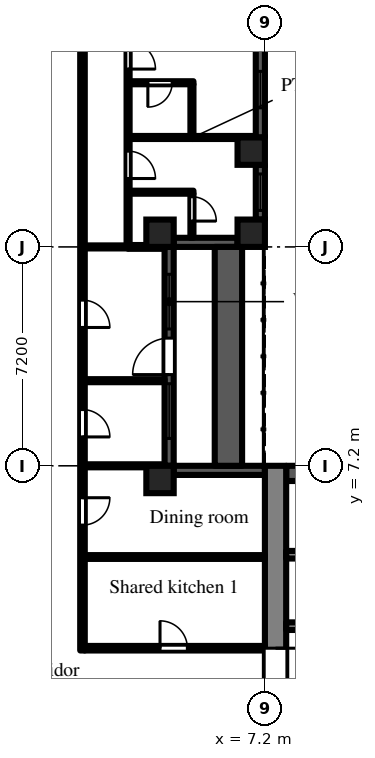
"""IFC4 building model, lengths in metres.
Left out: names, types, materials, properties, quantities, classifications, styles, units other than length and angle.
Written with IfcOpenShell. Run it as: python <this file> out.ifc"""

import sys

from ifc_helpers import new_model, si_unit, direction, frame, frame_2d, origin, origin_2d, place, context, subcontext, project, spatial, rectangle, extrude, element, fill, save


model = new_model("IFC4")
c1 = context("Model", 3, precision=1e-05, world=origin(), true_north=direction((0.0, 1.0)))
c2 = subcontext(c1, "Body", "Model", "MODEL_VIEW")
j1 = project(units=[si_unit("LENGTHUNIT", "METRE"), si_unit("PLANEANGLEUNIT", "RADIAN")], contexts=[c1])
p1 = place(None, origin())
s1 = spatial("IfcSite", under=j1, at=p1, CompositionType="ELEMENT")
p2 = place(p1, origin())
s2 = spatial("IfcBuilding", under=s1, at=p2, CompositionType="ELEMENT")
p3 = place(p2, frame((0.0, 0.0, 35.7)))
s3 = spatial("IfcBuildingStorey", under=s2, at=p3, CompositionType="ELEMENT", Elevation=35.7)
for number, where, z_axis, x_axis in (
    (1, (3.75, 6.75, 0.0), (0.0, 0.0, 1.0), (1.0, 0.0, 0.0)),
    (2, (3.75, 14.85, 0.0), (0.0, 0.0, 1.0), (1.0, 0.0, 0.0)),
    (3, (6.75, 14.85, 0.0), (0.0, 0.0, 1.0), (1.0, 0.0, 0.0)),
    (4, (6.75, 17.55, 0.0), (0.0, 0.0, 1.0), (1.0, 0.0, 0.0)),
):
    element("IfcColumn", number, at=place(p3, frame(where, z_axis=z_axis, x_axis=x_axis)), inside=s3, PredefinedType="COLUMN", context=c2, shape_type="SweptSolid", body=[
        extrude(rectangle(XDim=0.9, YDim=0.9, at=origin_2d()), origin(), (0.0, 0.0, 1.0), 3.0),
    ])
p4 = place(p3, frame((7.2, 7.05, 0.0), z_axis=(0.0, 0.0, 1.0), x_axis=(-1.0, 0.0, 0.0)))
e5 = element("IfcWall", 5, at=p4, inside=s3, PredefinedType="SOLIDWALL", context=c2, shape_type="SweptSolid", body=[
    extrude(rectangle(XDim=3.0, YDim=0.3, at=frame_2d((1.5, 0.0))), origin(), (0.0, 0.0, 1.0), 2.1),
])
p5 = place(p3, frame((4.05, 7.2, 0.0), z_axis=(0.0, 0.0, 1.0), x_axis=(0.0, 1.0, 0.0)))
e6 = element("IfcWall", 6, at=p5, inside=s3, PredefinedType="SOLIDWALL", context=c2, shape_type="SweptSolid", body=[
    extrude(rectangle(XDim=7.2, YDim=0.3, at=frame_2d((3.6, 0.0))), origin(), (0.0, 0.0, 1.0), 2.1),
])
p6 = place(p5, frame((3.0, 0.0, 0.0)))
e7 = element("IfcOpeningElement", 7, at=p6, cuts=e6, PredefinedType="OPENING", context=c2, shape_type="SweptSolid", body=[
    extrude(rectangle(XDim=1.2, YDim=2.05, at=frame_2d((0.6, 1.025))), frame((0.0, 0.16, 0.0), z_axis=(0.0, -1.0, 0.0), x_axis=(1.0, 0.0, 0.0)), (0.0, 0.0, 1.0), 0.32),
])
p7 = place(p5, frame((0.9, 0.0, 0.2)))
e8 = element("IfcOpeningElement", 8, at=p7, cuts=e6, PredefinedType="OPENING", context=c2, shape_type="SweptSolid", body=[
    extrude(rectangle(XDim=1.8, YDim=1.85, at=frame_2d((0.9, 0.925))), frame((0.0, 0.16, 0.0), z_axis=(0.0, -1.0, 0.0), x_axis=(1.0, 0.0, 0.0)), (0.0, 0.0, 1.0), 0.32),
])
p8 = place(p5, frame((4.5, 0.0, 0.2)))
e9 = element("IfcOpeningElement", 9, at=p8, cuts=e6, PredefinedType="OPENING", context=c2, shape_type="SweptSolid", body=[
    extrude(rectangle(XDim=1.8, YDim=1.85, at=frame_2d((0.9, 0.925))), frame((0.0, 0.16, 0.0), z_axis=(0.0, -1.0, 0.0), x_axis=(1.0, 0.0, 0.0)), (0.0, 0.0, 1.0), 0.32),
])
p9 = place(p3, frame((4.2, 14.55, 0.0), z_axis=(0.0, 0.0, 1.0), x_axis=(1.0, 0.0, 0.0)))
e10 = element("IfcWall", 10, at=p9, inside=s3, PredefinedType="SOLIDWALL", context=c2, shape_type="SweptSolid", body=[
    extrude(rectangle(XDim=2.1, YDim=0.3, at=frame_2d((1.05, 0.0))), origin(), (0.0, 0.0, 1.0), 2.1),
])
p10 = place(p3, frame((7.05, 15.3, 0.0), z_axis=(0.0, 0.0, 1.0), x_axis=(0.0, 1.0, 0.0)))
e11 = element("IfcWall", 11, at=p10, inside=s3, PredefinedType="SOLIDWALL", context=c2, shape_type="SweptSolid", body=[
    extrude(rectangle(XDim=1.8, YDim=0.3, at=frame_2d((0.9, 0.0))), origin(), (0.0, 0.0, 1.0), 2.1),
])
p11 = place(p10, frame((0.3, 0.0, 0.2)))
e12 = element("IfcOpeningElement", 12, at=p11, cuts=e11, PredefinedType="OPENING", context=c2, shape_type="SweptSolid", body=[
    extrude(rectangle(XDim=1.2, YDim=1.85, at=frame_2d((0.6, 0.925))), frame((0.0, 0.16, 0.0), z_axis=(0.0, -1.0, 0.0), x_axis=(1.0, 0.0, 0.0)), (0.0, 0.0, 1.0), 0.32),
])
p12 = place(p3, frame((7.05, 18.0, 0.0), z_axis=(0.0, 0.0, 1.0), x_axis=(0.0, 1.0, 0.0)))
e13 = element("IfcWall", 13, at=p12, inside=s3, PredefinedType="SOLIDWALL", context=c2, shape_type="SweptSolid", body=[
    extrude(rectangle(XDim=3.15, YDim=0.3, at=frame_2d((1.575, 0.0))), origin(), (0.0, 0.0, 1.0), 2.1),
])
p13 = place(p12, frame((0.975, 0.0, 0.2)))
e14 = element("IfcOpeningElement", 14, at=p13, cuts=e13, PredefinedType="OPENING", context=c2, shape_type="SweptSolid", body=[
    extrude(rectangle(XDim=1.2, YDim=1.85, at=frame_2d((0.6, 0.925))), frame((0.0, 0.16, 0.0), z_axis=(0.0, -1.0, 0.0), x_axis=(1.0, 0.0, 0.0)), (0.0, 0.0, 1.0), 0.32),
])
p14 = place(p3, frame((6.0, 7.2, 0.0), z_axis=(0.0, 0.0, 1.0), x_axis=(0.0, 1.0, 0.0)))
e15 = element("IfcWall", 15, at=p14, inside=s3, PredefinedType="PARAPET", context=c2, shape_type="SweptSolid", body=[
    extrude(rectangle(XDim=7.2, YDim=0.9, at=frame_2d((3.6, 0.0))), origin(), (0.0, 0.0, 1.0), 0.8),
])
p15 = place(p3, frame((7.55, -7.2, 0.0), z_axis=(0.0, 0.0, 1.0), x_axis=(0.0, 1.0, 0.0)))
e16 = element("IfcWall", 16, at=p15, inside=s3, PredefinedType="SHEAR", context=c2, shape_type="SweptSolid", body=[
    extrude(rectangle(XDim=14.4, YDim=0.7, at=frame_2d((7.2, 0.0))), origin(), (0.0, 0.0, 1.0), 2.575),
])
p16 = place(p15, frame((6.0, 0.0, 0.0)))
e17 = element("IfcOpeningElement", 17, at=p16, cuts=e16, PredefinedType="OPENING", context=c2, shape_type="SweptSolid", body=[
    extrude(rectangle(XDim=2.4, YDim=2.2, at=frame_2d((1.2, 1.1))), frame((0.0, 0.36, 0.0), z_axis=(0.0, -1.0, 0.0), x_axis=(1.0, 0.0, 0.0)), (0.0, 0.0, 1.0), 0.72),
])
p17 = place(p3, frame((7.9, 6.95, 0.0), z_axis=(0.0, 0.0, 1.0), x_axis=(1.0, 0.0, 0.0)))
e18 = element("IfcWall", 18, at=p17, inside=s3, PredefinedType="SHEAR", context=c2, shape_type="SweptSolid", body=[
    extrude(rectangle(XDim=12.95, YDim=0.5, at=frame_2d((6.475, 0.0))), origin(), (0.0, 0.0, 1.0), 2.575),
])
p18 = place(p3, frame((7.9, 1.925, 0.0), z_axis=(0.0, 0.0, 1.0), x_axis=(1.0, 0.0, 0.0)))
e19 = element("IfcWall", 19, at=p18, inside=s3, PredefinedType="SHEAR", context=c2, shape_type="SweptSolid", body=[
    extrude(rectangle(XDim=12.95, YDim=0.25, at=frame_2d((6.475, 0.0))), origin(), (0.0, 0.0, 1.0), 2.575),
])
p19 = place(p18, frame((0.525, 0.0, 0.0)))
e20 = element("IfcOpeningElement", 20, at=p19, cuts=e19, PredefinedType="OPENING", context=c2, shape_type="SweptSolid", body=[
    extrude(rectangle(XDim=0.9, YDim=2.1, at=frame_2d((0.45, 1.05))), frame((0.0, 0.135, 0.0), z_axis=(0.0, -1.0, 0.0), x_axis=(1.0, 0.0, 0.0)), (0.0, 0.0, 1.0), 0.27),
])
p20 = place(p18, frame((2.625, 0.0, 0.0)))
e21 = element("IfcOpeningElement", 21, at=p20, cuts=e19, PredefinedType="OPENING", context=c2, shape_type="SweptSolid", body=[
    extrude(rectangle(XDim=1.1, YDim=2.1, at=frame_2d((0.55, 1.05))), frame((0.0, 0.135, 0.0), z_axis=(0.0, -1.0, 0.0), x_axis=(1.0, 0.0, 0.0)), (0.0, 0.0, 1.0), 0.27),
])
p21 = place(p18, frame((7.125, 0.0, 0.0)))
e22 = element("IfcOpeningElement", 22, at=p21, cuts=e19, PredefinedType="OPENING", context=c2, shape_type="SweptSolid", body=[
    extrude(rectangle(XDim=0.9, YDim=2.1, at=frame_2d((0.45, 1.05))), frame((0.0, 0.135, 0.0), z_axis=(0.0, -1.0, 0.0), x_axis=(1.0, 0.0, 0.0)), (0.0, 0.0, 1.0), 0.27),
])
p22 = place(p3, frame((7.9, 4.275, 0.0), z_axis=(0.0, 0.0, 1.0), x_axis=(1.0, 0.0, 0.0)))
e23 = element("IfcWall", 23, at=p22, inside=s3, PredefinedType="SHEAR", context=c2, shape_type="SweptSolid", body=[
    extrude(rectangle(XDim=1.95, YDim=0.25, at=frame_2d((0.975, 0.0))), origin(), (0.0, 0.0, 1.0), 2.575),
])
p23 = place(p3, frame((1.2, 1.125, 0.0), z_axis=(0.0, 0.0, 1.0), x_axis=(0.0, 1.0, 0.0)))
e24 = element("IfcWall", 24, at=p23, inside=s3, PredefinedType="PARTITIONING", context=c2, shape_type="SweptSolid", body=[
    extrude(rectangle(XDim=35.375, YDim=0.15, at=frame_2d((17.688, 0.0))), origin(), (0.0, 0.0, 1.0), 2.575),
])
p24 = place(p23, frame((4.125, 0.0, 0.0)))
e25 = element("IfcOpeningElement", 25, at=p24, cuts=e24, PredefinedType="OPENING", context=c2, shape_type="SweptSolid", body=[
    extrude(rectangle(XDim=0.9, YDim=2.1, at=frame_2d((0.45, 1.05))), frame((0.0, 0.085, 0.0), z_axis=(0.0, -1.0, 0.0), x_axis=(1.0, 0.0, 0.0)), (0.0, 0.0, 1.0), 0.17),
])
p25 = place(p23, frame((7.025, 0.0, 0.0)))
e26 = element("IfcOpeningElement", 26, at=p25, cuts=e24, PredefinedType="OPENING", context=c2, shape_type="SweptSolid", body=[
    extrude(rectangle(XDim=0.9, YDim=2.1, at=frame_2d((0.45, 1.05))), frame((0.0, 0.085, 0.0), z_axis=(0.0, -1.0, 0.0), x_axis=(1.0, 0.0, 0.0)), (0.0, 0.0, 1.0), 0.17),
])
p26 = place(p23, frame((10.625, 0.0, 0.0)))
e27 = element("IfcOpeningElement", 27, at=p26, cuts=e24, PredefinedType="OPENING", context=c2, shape_type="SweptSolid", body=[
    extrude(rectangle(XDim=0.9, YDim=2.1, at=frame_2d((0.45, 1.05))), frame((0.0, 0.085, 0.0), z_axis=(0.0, -1.0, 0.0), x_axis=(1.0, 0.0, 0.0)), (0.0, 0.0, 1.0), 0.17),
])
p27 = place(p23, frame((32.825, 0.0, 0.0)))
e28 = element("IfcOpeningElement", 28, at=p27, cuts=e24, PredefinedType="OPENING", context=c2, shape_type="SweptSolid", body=[
    extrude(rectangle(XDim=1.0, YDim=2.1, at=frame_2d((0.5, 1.05))), frame((0.0, 0.085, 0.0), z_axis=(0.0, -1.0, 0.0), x_axis=(1.0, 0.0, 0.0)), (0.0, 0.0, 1.0), 0.17),
])
p28 = place(p3, frame((1.275, 1.2, 0.0), z_axis=(0.0, 0.0, 1.0), x_axis=(1.0, 0.0, 0.0)))
e29 = element("IfcWall", 29, at=p28, inside=s3, PredefinedType="PARTITIONING", context=c2, shape_type="SweptSolid", body=[
    extrude(rectangle(XDim=5.925, YDim=0.15, at=frame_2d((2.962, 0.0))), origin(), (0.0, 0.0, 1.0), 2.575),
])
p29 = place(p28, frame((2.475, 0.0, 0.0)))
e30 = element("IfcOpeningElement", 30, at=p29, cuts=e29, PredefinedType="OPENING", context=c2, shape_type="SweptSolid", body=[
    extrude(rectangle(XDim=0.9, YDim=2.1, at=frame_2d((0.45, 1.05))), frame((0.0, 0.085, 0.0), z_axis=(0.0, -1.0, 0.0), x_axis=(1.0, 0.0, 0.0)), (0.0, 0.0, 1.0), 0.17),
])
p30 = place(p3, frame((1.275, 4.2, 0.0), z_axis=(0.0, 0.0, 1.0), x_axis=(1.0, 0.0, 0.0)))
e31 = element("IfcWall", 31, at=p30, inside=s3, PredefinedType="PARTITIONING", context=c2, shape_type="SweptSolid", body=[
    extrude(rectangle(XDim=5.925, YDim=0.125, at=frame_2d((2.962, 0.0))), origin(), (0.0, 0.0, 1.0), 2.575),
])
for number, where, z_axis, x_axis in (
    (32, (1.275, 7.2, 0.0), (0.0, 0.0, 1.0), (1.0, 0.0, 0.0)),
    (33, (1.275, 10.0, 0.0), (0.0, 0.0, 1.0), (1.0, 0.0, 0.0)),
):
    element("IfcWall", number, at=place(p3, frame(where, z_axis=z_axis, x_axis=x_axis)), inside=s3, PredefinedType="PARTITIONING", context=c2, shape_type="SweptSolid", body=[
        extrude(rectangle(XDim=2.625, YDim=0.1, at=frame_2d((1.312, 0.0))), origin(), (0.0, 0.0, 1.0), 2.575),
    ])
p31 = place(p3, frame((1.275, 14.4, 0.0), z_axis=(0.0, 0.0, 1.0), x_axis=(1.0, 0.0, 0.0)))
e34 = element("IfcWall", 34, at=p31, inside=s3, PredefinedType="PARTITIONING", context=c2, shape_type="SweptSolid", body=[
    extrude(rectangle(XDim=1.425, YDim=0.1, at=frame_2d((0.712, 0.0))), origin(), (0.0, 0.0, 1.0), 2.575),
])
p32 = place(p3, frame((2.7, 14.462, 0.0), z_axis=(0.0, 0.0, 1.0), x_axis=(0.0, 1.0, 0.0)))
e35 = element("IfcWall", 35, at=p32, inside=s3, PredefinedType="PARTITIONING", context=c2, shape_type="SweptSolid", body=[
    extrude(rectangle(XDim=17.888, YDim=0.1, at=frame_2d((8.944, 0.0))), origin(), (0.0, 0.0, 1.0), 2.575),
])
p33 = place(p32, frame((2.188, 0.0, 0.0)))
e36 = element("IfcOpeningElement", 36, at=p33, cuts=e35, PredefinedType="OPENING", context=c2, shape_type="SweptSolid", body=[
    extrude(rectangle(XDim=0.9, YDim=2.1, at=frame_2d((0.45, 1.05))), frame((0.0, 0.06, 0.0), z_axis=(0.0, -1.0, 0.0), x_axis=(1.0, 0.0, 0.0)), (0.0, 0.0, 1.0), 0.12),
])
p34 = place(p32, frame((5.788, 0.0, 0.0)))
e37 = element("IfcOpeningElement", 37, at=p34, cuts=e35, PredefinedType="OPENING", context=c2, shape_type="SweptSolid", body=[
    extrude(rectangle(XDim=0.9, YDim=2.1, at=frame_2d((0.45, 1.05))), frame((0.0, 0.06, 0.0), z_axis=(0.0, -1.0, 0.0), x_axis=(1.0, 0.0, 0.0)), (0.0, 0.0, 1.0), 0.12),
])
p35 = place(p32, frame((7.587, 0.0, 0.0)))
e38 = element("IfcOpeningElement", 38, at=p35, cuts=e35, PredefinedType="OPENING", context=c2, shape_type="SweptSolid", body=[
    extrude(rectangle(XDim=0.9, YDim=2.1, at=frame_2d((0.45, 1.05))), frame((0.0, 0.06, 0.0), z_axis=(0.0, -1.0, 0.0), x_axis=(1.0, 0.0, 0.0)), (0.0, 0.0, 1.0), 0.12),
])
p36 = place(p32, frame((12.988, 0.0, 0.0)))
e39 = element("IfcOpeningElement", 39, at=p36, cuts=e35, PredefinedType="OPENING", context=c2, shape_type="SweptSolid", body=[
    extrude(rectangle(XDim=0.9, YDim=2.1, at=frame_2d((0.45, 1.05))), frame((0.0, 0.06, 0.0), z_axis=(0.0, -1.0, 0.0), x_axis=(1.0, 0.0, 0.0)), (0.0, 0.0, 1.0), 0.12),
])
p37 = place(p32, frame((14.788, 0.0, 0.0)))
e40 = element("IfcOpeningElement", 40, at=p37, cuts=e35, PredefinedType="OPENING", context=c2, shape_type="SweptSolid", body=[
    extrude(rectangle(XDim=0.9, YDim=2.1, at=frame_2d((0.45, 1.05))), frame((0.0, 0.06, 0.0), z_axis=(0.0, -1.0, 0.0), x_axis=(1.0, 0.0, 0.0)), (0.0, 0.0, 1.0), 0.12),
])
p38 = place(p3, frame((2.7, 14.4, 0.0), z_axis=(0.0, 0.0, 1.0), x_axis=(1.0, 0.0, 0.0)))
e41 = element("IfcWall", 41, at=p38, inside=s3, PredefinedType="PARTITIONING", context=c2, shape_type="SweptSolid", body=[
    extrude(rectangle(XDim=1.2, YDim=0.125, at=frame_2d((0.6, 0.0))), origin(), (0.0, 0.0, 1.0), 2.575),
])
p39 = place(p3, frame((2.75, 16.2, 0.0), z_axis=(0.0, 0.0, 1.0), x_axis=(1.0, 0.0, 0.0)))
e42 = element("IfcWall", 42, at=p39, inside=s3, PredefinedType="PARTITIONING", context=c2, shape_type="SweptSolid", body=[
    extrude(rectangle(XDim=2.1, YDim=0.1, at=frame_2d((1.05, 0.0))), origin(), (0.0, 0.0, 1.0), 2.575),
])
p40 = place(p3, frame((2.75, 18.0, 0.0), z_axis=(0.0, 0.0, 1.0), x_axis=(1.0, 0.0, 0.0)))
e43 = element("IfcWall", 43, at=p40, inside=s3, PredefinedType="PARTITIONING", context=c2, shape_type="SweptSolid", body=[
    extrude(rectangle(XDim=4.15, YDim=0.1, at=frame_2d((2.075, 0.0))), origin(), (0.0, 0.0, 1.0), 2.575),
])
p41 = place(p3, frame((2.75, 19.8, 0.0), z_axis=(0.0, 0.0, 1.0), x_axis=(1.0, 0.0, 0.0)))
e44 = element("IfcWall", 44, at=p41, inside=s3, PredefinedType="PARTITIONING", context=c2, shape_type="SweptSolid", body=[
    extrude(rectangle(XDim=2.1, YDim=0.1, at=frame_2d((1.05, 0.0))), origin(), (0.0, 0.0, 1.0), 2.575),
])
p42 = place(p41, frame((0.6, 0.0, 0.0)))
e45 = element("IfcOpeningElement", 45, at=p42, cuts=e44, PredefinedType="OPENING", context=c2, shape_type="SweptSolid", body=[
    extrude(rectangle(XDim=0.8, YDim=2.1, at=frame_2d((0.4, 1.05))), frame((0.0, 0.06, 0.0), z_axis=(0.0, -1.0, 0.0), x_axis=(1.0, 0.0, 0.0)), (0.0, 0.0, 1.0), 0.12),
])
p43 = place(p3, frame((4.8, 14.7, 0.0), z_axis=(0.0, 0.0, 1.0), x_axis=(0.0, 1.0, 0.0)))
e46 = element("IfcWall", 46, at=p43, inside=s3, PredefinedType="PARTITIONING", context=c2, shape_type="SweptSolid", body=[
    extrude(rectangle(XDim=1.45, YDim=0.1, at=frame_2d((0.725, 0.0))), origin(), (0.0, 0.0, 1.0), 2.575),
])
p44 = place(p43, frame((0.55, 0.0, 0.0)))
e47 = element("IfcOpeningElement", 47, at=p44, cuts=e46, PredefinedType="OPENING", context=c2, shape_type="SweptSolid", body=[
    extrude(rectangle(XDim=0.8, YDim=2.1, at=frame_2d((0.4, 1.05))), frame((0.0, 0.06, 0.0), z_axis=(0.0, -1.0, 0.0), x_axis=(1.0, 0.0, 0.0)), (0.0, 0.0, 1.0), 0.12),
])
p45 = place(p3, frame((4.8, 18.05, 0.0), z_axis=(0.0, 0.0, 1.0), x_axis=(0.0, 1.0, 0.0)))
e48 = element("IfcWall", 48, at=p45, inside=s3, PredefinedType="PARTITIONING", context=c2, shape_type="SweptSolid", body=[
    extrude(rectangle(XDim=1.7, YDim=0.1, at=frame_2d((0.85, 0.0))), origin(), (0.0, 0.0, 1.0), 2.575),
])
p46 = place(p6, origin())
e49 = element("IfcDoor", 49, at=p46, inside=s3, OperationType="SINGLE_SWING_LEFT", PredefinedType="DOOR", context=c2, shape_type="SweptSolid", body=[
    extrude(rectangle(XDim=1.2, YDim=2.05, at=frame_2d((0.6, 1.025))), frame((0.0, 0.025, 0.0), z_axis=(0.0, -1.0, 0.0), x_axis=(1.0, 0.0, 0.0)), (0.0, 0.0, 1.0), 0.05),
])
fill(e7, e49)
p47 = place(p7, origin())
e50 = element("IfcWindow", 50, at=p47, inside=s3, PartitioningType="SINGLE_PANEL", PredefinedType="WINDOW", context=c2, shape_type="SweptSolid", body=[
    extrude(rectangle(XDim=1.8, YDim=1.85, at=frame_2d((0.9, 0.925))), frame((0.0, 0.03, 0.0), z_axis=(0.0, -1.0, 0.0), x_axis=(1.0, 0.0, 0.0)), (0.0, 0.0, 1.0), 0.06),
])
fill(e8, e50)
p48 = place(p8, origin())
e51 = element("IfcWindow", 51, at=p48, inside=s3, PartitioningType="SINGLE_PANEL", PredefinedType="WINDOW", context=c2, shape_type="SweptSolid", body=[
    extrude(rectangle(XDim=1.8, YDim=1.85, at=frame_2d((0.9, 0.925))), frame((0.0, 0.03, 0.0), z_axis=(0.0, -1.0, 0.0), x_axis=(1.0, 0.0, 0.0)), (0.0, 0.0, 1.0), 0.06),
])
fill(e9, e51)
p49 = place(p11, origin())
e52 = element("IfcWindow", 52, at=p49, inside=s3, PartitioningType="SINGLE_PANEL", PredefinedType="WINDOW", context=c2, shape_type="SweptSolid", body=[
    extrude(rectangle(XDim=1.2, YDim=1.85, at=frame_2d((0.6, 0.925))), frame((0.0, 0.03, 0.0), z_axis=(0.0, -1.0, 0.0), x_axis=(1.0, 0.0, 0.0)), (0.0, 0.0, 1.0), 0.06),
])
fill(e12, e52)
p50 = place(p13, origin())
e53 = element("IfcWindow", 53, at=p50, inside=s3, PartitioningType="SINGLE_PANEL", PredefinedType="WINDOW", context=c2, shape_type="SweptSolid", body=[
    extrude(rectangle(XDim=1.2, YDim=1.85, at=frame_2d((0.6, 0.925))), frame((0.0, 0.03, 0.0), z_axis=(0.0, -1.0, 0.0), x_axis=(1.0, 0.0, 0.0)), (0.0, 0.0, 1.0), 0.06),
])
fill(e14, e53)
p51 = place(p16, frame((2.4, 0.0, 0.0), z_axis=(0.0, 0.0, 1.0), x_axis=(-1.0, 0.0, 0.0)))
e54 = element("IfcDoor", 54, at=p51, inside=s3, OperationType="DOUBLE_DOOR_DOUBLE_SWING", PredefinedType="DOOR", context=c2, shape_type="SweptSolid", body=[
    extrude(rectangle(XDim=2.4, YDim=2.2, at=frame_2d((1.2, 1.1))), frame((0.0, 0.025, 0.0), z_axis=(0.0, -1.0, 0.0), x_axis=(1.0, 0.0, 0.0)), (0.0, 0.0, 1.0), 0.05),
])
fill(e17, e54)
p52 = place(p29, origin())
e55 = element("IfcDoor", 55, at=p52, inside=s3, OperationType="SINGLE_SWING_LEFT", PredefinedType="DOOR", context=c2, shape_type="SweptSolid", body=[
    extrude(rectangle(XDim=0.9, YDim=2.1, at=frame_2d((0.45, 1.05))), frame((0.0, 0.025, 0.0), z_axis=(0.0, -1.0, 0.0), x_axis=(1.0, 0.0, 0.0)), (0.0, 0.0, 1.0), 0.05),
])
fill(e30, e55)
p53 = place(p24, frame((0.9, 0.0, 0.0), z_axis=(0.0, 0.0, 1.0), x_axis=(-1.0, 0.0, 0.0)))
e56 = element("IfcDoor", 56, at=p53, inside=s3, OperationType="SINGLE_SWING_LEFT", PredefinedType="DOOR", context=c2, shape_type="SweptSolid", body=[
    extrude(rectangle(XDim=0.9, YDim=2.1, at=frame_2d((0.45, 1.05))), frame((0.0, 0.025, 0.0), z_axis=(0.0, -1.0, 0.0), x_axis=(1.0, 0.0, 0.0)), (0.0, 0.0, 1.0), 0.05),
])
fill(e25, e56)
p54 = place(p25, frame((0.9, 0.0, 0.0), z_axis=(0.0, 0.0, 1.0), x_axis=(-1.0, 0.0, 0.0)))
e57 = element("IfcDoor", 57, at=p54, inside=s3, OperationType="SINGLE_SWING_RIGHT", PredefinedType="DOOR", context=c2, shape_type="SweptSolid", body=[
    extrude(rectangle(XDim=0.9, YDim=2.1, at=frame_2d((0.45, 1.05))), frame((0.0, 0.025, 0.0), z_axis=(0.0, -1.0, 0.0), x_axis=(1.0, 0.0, 0.0)), (0.0, 0.0, 1.0), 0.05),
])
fill(e26, e57)
p55 = place(p26, frame((0.9, 0.0, 0.0), z_axis=(0.0, 0.0, 1.0), x_axis=(-1.0, 0.0, 0.0)))
e58 = element("IfcDoor", 58, at=p55, inside=s3, OperationType="SINGLE_SWING_RIGHT", PredefinedType="DOOR", context=c2, shape_type="SweptSolid", body=[
    extrude(rectangle(XDim=0.9, YDim=2.1, at=frame_2d((0.45, 1.05))), frame((0.0, 0.025, 0.0), z_axis=(0.0, -1.0, 0.0), x_axis=(1.0, 0.0, 0.0)), (0.0, 0.0, 1.0), 0.05),
])
fill(e27, e58)
p56 = place(p33, frame((0.9, 0.0, 0.0), z_axis=(0.0, 0.0, 1.0), x_axis=(-1.0, 0.0, 0.0)))
e59 = element("IfcDoor", 59, at=p56, inside=s3, OperationType="SINGLE_SWING_RIGHT", PredefinedType="DOOR", context=c2, shape_type="SweptSolid", body=[
    extrude(rectangle(XDim=0.9, YDim=2.1, at=frame_2d((0.45, 1.05))), frame((0.0, 0.025, 0.0), z_axis=(0.0, -1.0, 0.0), x_axis=(1.0, 0.0, 0.0)), (0.0, 0.0, 1.0), 0.05),
])
fill(e36, e59)
p57 = place(p34, frame((0.9, 0.0, 0.0), z_axis=(0.0, 0.0, 1.0), x_axis=(-1.0, 0.0, 0.0)))
e60 = element("IfcDoor", 60, at=p57, inside=s3, OperationType="SINGLE_SWING_RIGHT", PredefinedType="DOOR", context=c2, shape_type="SweptSolid", body=[
    extrude(rectangle(XDim=0.9, YDim=2.1, at=frame_2d((0.45, 1.05))), frame((0.0, 0.025, 0.0), z_axis=(0.0, -1.0, 0.0), x_axis=(1.0, 0.0, 0.0)), (0.0, 0.0, 1.0), 0.05),
])
fill(e37, e60)
p58 = place(p44, frame((0.8, 0.0, 0.0), z_axis=(0.0, 0.0, 1.0), x_axis=(-1.0, 0.0, 0.0)))
e61 = element("IfcDoor", 61, at=p58, inside=s3, OperationType="SINGLE_SWING_RIGHT", PredefinedType="DOOR", context=c2, shape_type="SweptSolid", body=[
    extrude(rectangle(XDim=0.8, YDim=2.1, at=frame_2d((0.4, 1.05))), frame((0.0, 0.025, 0.0), z_axis=(0.0, -1.0, 0.0), x_axis=(1.0, 0.0, 0.0)), (0.0, 0.0, 1.0), 0.05),
])
fill(e47, e61)
p59 = place(p42, frame((0.8, 0.0, 0.0), z_axis=(0.0, 0.0, 1.0), x_axis=(-1.0, 0.0, 0.0)))
e62 = element("IfcDoor", 62, at=p59, inside=s3, OperationType="SINGLE_SWING_RIGHT", PredefinedType="DOOR", context=c2, shape_type="SweptSolid", body=[
    extrude(rectangle(XDim=0.8, YDim=2.1, at=frame_2d((0.4, 1.05))), frame((0.0, 0.025, 0.0), z_axis=(0.0, -1.0, 0.0), x_axis=(1.0, 0.0, 0.0)), (0.0, 0.0, 1.0), 0.05),
])
fill(e45, e62)
save(model, sys.argv[1])
